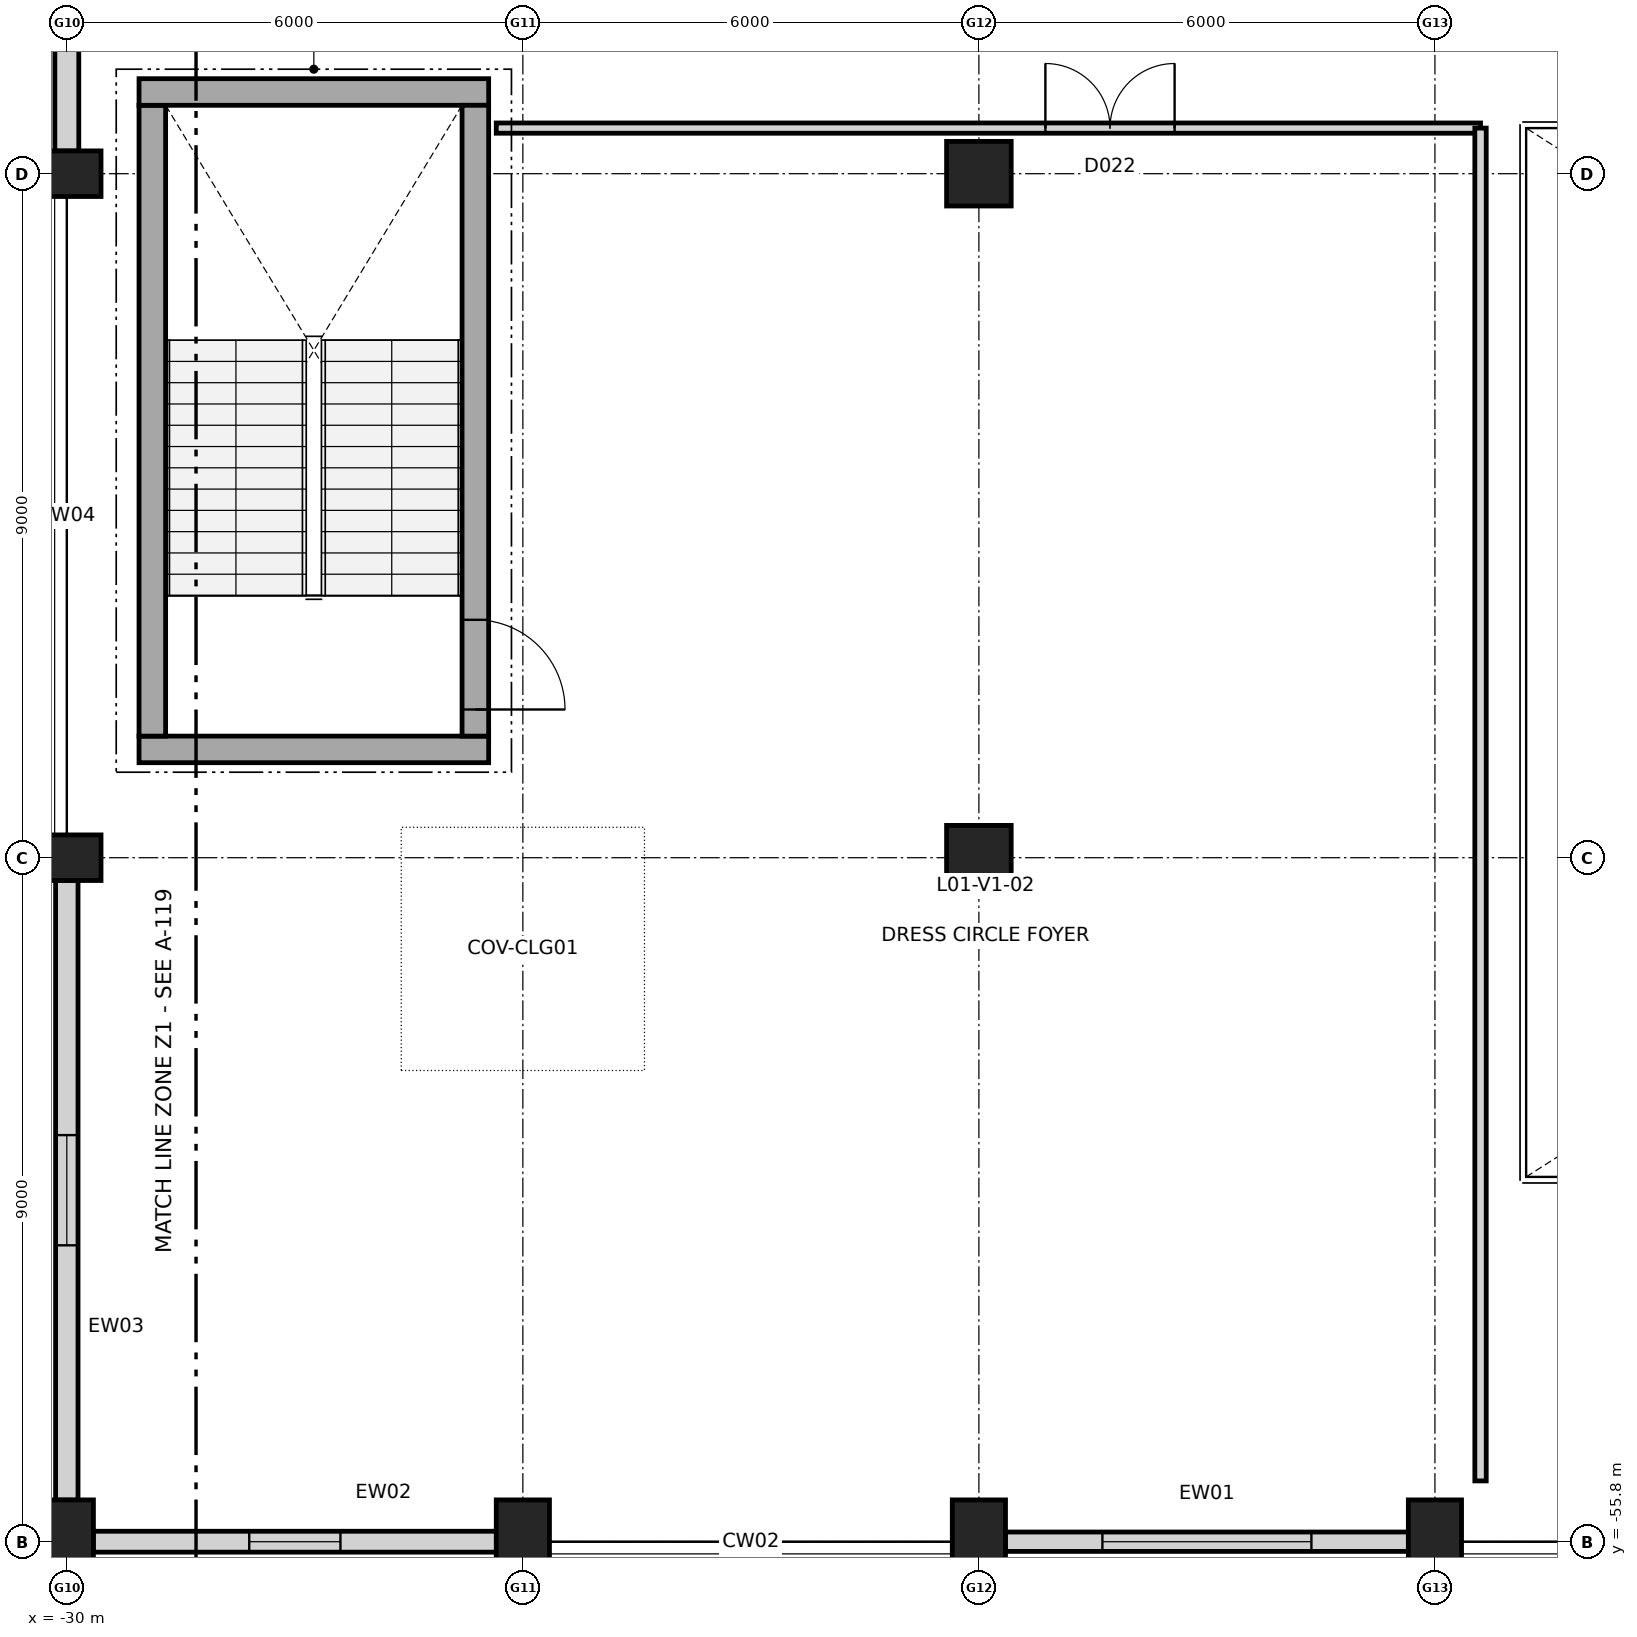
"""IFC4 building model, lengths in metres.
Left out: names, types, materials, properties, quantities, classifications, styles, units other than length and angle.
Written with IfcOpenShell. Run it as: python <this file> out.ifc"""

import sys

from ifc_helpers import new_model, si_unit, direction, frame, frame_2d, origin, origin_2d, place, context, subcontext, project, spatial, rectangle, circle, extrude, element, fill, save


model = new_model("IFC4")
c1 = context("Model", 3, precision=1e-05, world=origin(), true_north=direction((0.0, 1.0)))
c2 = subcontext(c1, "Body", "Model", "MODEL_VIEW")
j1 = project(units=[si_unit("LENGTHUNIT", "METRE"), si_unit("PLANEANGLEUNIT", "RADIAN")], contexts=[c1])
p1 = place(None, origin())
s1 = spatial("IfcSite", under=j1, at=p1, CompositionType="ELEMENT")
p2 = place(p1, origin())
s2 = spatial("IfcBuilding", under=s1, at=p2, CompositionType="ELEMENT")
p3 = place(p2, frame((0.0, 0.0, 5.4)))
s3 = spatial("IfcBuildingStorey", under=s2, at=p3, CompositionType="ELEMENT", Elevation=5.4)
p4 = place(p3, frame((-30.0, -55.8, 0.0), z_axis=(0.0, 0.0, 1.0), x_axis=(1.0, 0.0, 0.0)))
e1 = element("IfcColumn", 1, at=p4, inside=s3, PredefinedType="COLUMN", context=c2, shape_type="SweptSolid", body=[
    extrude(rectangle(XDim=0.7, YDim=1.1, at=origin_2d()), origin(), (0.0, 0.0, 1.0), 4.8),
])
for number, where, z_axis, x_axis in (
    (2, (-30.0, -46.8, 0.0), (0.0, 0.0, 1.0), (0.0, 1.0, 0.0)),
    (3, (-30.0, -37.8, 0.0), (0.0, 0.0, 1.0), (0.0, 1.0, 0.0)),
):
    element("IfcColumn", number, at=place(p3, frame(where, z_axis=z_axis, x_axis=x_axis)), inside=s3, PredefinedType="COLUMN", context=c2, shape_type="SweptSolid", body=[
        extrude(rectangle(XDim=0.6, YDim=0.9, at=origin_2d()), origin(), (0.0, 0.0, 1.0), 4.8),
    ])
for number, where, z_axis, x_axis in (
    (4, (-24.0, -55.8, 0.0), (0.0, 0.0, 1.0), (1.0, 0.0, 0.0)),
    (5, (-18.0, -55.8, 0.0), (0.0, 0.0, 1.0), (1.0, 0.0, 0.0)),
):
    element("IfcColumn", number, at=place(p3, frame(where, z_axis=z_axis, x_axis=x_axis)), inside=s3, PredefinedType="COLUMN", context=c2, shape_type="SweptSolid", body=[
        extrude(rectangle(XDim=0.7, YDim=1.1, at=origin_2d()), origin(), (0.0, 0.0, 1.0), 4.8),
    ])
for number, where, z_axis, x_axis in (
    (6, (-18.0, -46.8, 0.0), (0.0, 0.0, 1.0), (1.0, 0.0, 0.0)),
    (7, (-18.0, -37.8, 0.0), (0.0, 0.0, 1.0), (1.0, 0.0, 0.0)),
):
    element("IfcColumn", number, at=place(p3, frame(where, z_axis=z_axis, x_axis=x_axis)), inside=s3, PredefinedType="COLUMN", context=c2, shape_type="SweptSolid", body=[
        extrude(circle(Radius=0.425, at=origin_2d()), origin(), (0.0, 0.0, 1.0), 4.8),
    ])
p5 = place(p3, frame((-12.0, -55.8, 0.0), z_axis=(0.0, 0.0, 1.0), x_axis=(1.0, 0.0, 0.0)))
e8 = element("IfcColumn", 8, at=p5, inside=s3, PredefinedType="COLUMN", context=c2, shape_type="SweptSolid", body=[
    extrude(rectangle(XDim=0.7, YDim=1.1, at=origin_2d()), origin(), (0.0, 0.0, 1.0), 4.8),
])
p6 = place(p3, frame((-12.348, -55.8, 0.0), z_axis=(0.0, 0.0, 1.0), x_axis=(-1.0, 0.0, 0.0)))
e9 = element("IfcWall", 9, at=p6, inside=s3, PredefinedType="STANDARD", context=c2, shape_type="SweptSolid", body=[
    extrude(rectangle(XDim=5.304, YDim=0.255, at=frame_2d((2.652, 0.0))), origin(), (0.0, 0.0, 1.0), 3.74),
])
p7 = place(p6, frame((1.277, 0.0, 0.85)))
e10 = element("IfcOpeningElement", 10, at=p7, cuts=e9, PredefinedType="OPENING", context=c2, shape_type="SweptSolid", body=[
    extrude(rectangle(XDim=2.75, YDim=1.95, at=frame_2d((1.375, 0.975))), frame((0.0, 0.137, 0.0), z_axis=(0.0, -1.0, 0.0), x_axis=(1.0, 0.0, 0.0)), (0.0, 0.0, 1.0), 0.275),
])
p8 = place(p3, frame((-24.348, -55.8, 0.0), z_axis=(0.0, 0.0, 1.0), x_axis=(-1.0, 0.0, 0.0)))
e11 = element("IfcWall", 11, at=p8, inside=s3, PredefinedType="STANDARD", context=c2, shape_type="SweptSolid", body=[
    extrude(rectangle(XDim=5.304, YDim=0.275, at=frame_2d((2.652, 0.0))), origin(), (0.0, 0.0, 1.0), 3.74),
])
p9 = place(p8, frame((2.052, 0.0, 0.85)))
e12 = element("IfcOpeningElement", 12, at=p9, cuts=e11, PredefinedType="OPENING", context=c2, shape_type="SweptSolid", body=[
    extrude(rectangle(XDim=1.2, YDim=2.1, at=frame_2d((0.6, 1.05))), frame((0.0, 0.147, 0.0), z_axis=(0.0, -1.0, 0.0), x_axis=(1.0, 0.0, 0.0)), (0.0, 0.0, 1.0), 0.295),
])
p10 = place(p3, frame((-30.0, -55.252, 0.0), z_axis=(0.0, 0.0, 1.0), x_axis=(0.0, 1.0, 0.0)))
e13 = element("IfcWall", 13, at=p10, inside=s3, PredefinedType="STANDARD", context=c2, shape_type="SweptSolid", body=[
    extrude(rectangle(XDim=8.154, YDim=0.295, at=frame_2d((4.077, 0.0))), origin(), (0.0, 0.0, 1.0), 3.824),
])
p11 = place(p10, frame((3.352, 0.0, 0.85)))
e14 = element("IfcOpeningElement", 14, at=p11, cuts=e13, PredefinedType="OPENING", context=c2, shape_type="SweptSolid", body=[
    extrude(rectangle(XDim=1.45, YDim=2.1, at=frame_2d((0.725, 1.05))), frame((0.0, 0.157, 0.0), z_axis=(0.0, -1.0, 0.0), x_axis=(1.0, 0.0, 0.0)), (0.0, 0.0, 1.0), 0.315),
])
p12 = place(p3, frame((-30.0, -37.502, 0.0), z_axis=(0.0, 0.0, 1.0), x_axis=(0.0, 1.0, 0.0)))
e15 = element("IfcWall", 15, at=p12, inside=s3, PredefinedType="STANDARD", context=c2, shape_type="SweptSolid", body=[
    extrude(rectangle(XDim=8.404, YDim=0.315, at=frame_2d((4.202, 0.0))), origin(), (0.0, 0.0, 1.0), 3.824),
])
p13 = place(p12, frame((3.377, 0.0, 0.85)))
e16 = element("IfcOpeningElement", 16, at=p13, cuts=e15, PredefinedType="OPENING", context=c2, shape_type="SweptSolid", body=[
    extrude(rectangle(XDim=1.65, YDim=2.1, at=frame_2d((0.825, 1.05))), frame((0.0, 0.167, 0.0), z_axis=(0.0, -1.0, 0.0), x_axis=(1.0, 0.0, 0.0)), (0.0, 0.0, 1.0), 0.335),
])
p14 = place(p3, frame((-24.45, -45.375, 0.0), z_axis=(0.0, 0.0, 1.0), x_axis=(-1.0, 0.0, 0.0)))
e17 = element("IfcWall", 17, at=p14, inside=s3, PredefinedType="SHEAR", context=c2, shape_type="SweptSolid", body=[
    extrude(rectangle(XDim=4.6, YDim=0.35, at=frame_2d((2.3, 0.0))), origin(), (0.0, 0.0, 1.0), 4.8),
])
p15 = place(p3, frame((-28.875, -45.2, 0.0), z_axis=(0.0, 0.0, 1.0), x_axis=(0.0, 1.0, 0.0)))
e18 = element("IfcWall", 18, at=p15, inside=s3, PredefinedType="SHEAR", context=c2, shape_type="SweptSolid", body=[
    extrude(rectangle(XDim=8.3, YDim=0.35, at=frame_2d((4.15, 0.0))), origin(), (0.0, 0.0, 1.0), 4.8),
])
p16 = place(p3, frame((-29.05, -36.725, 0.0), z_axis=(0.0, 0.0, 1.0), x_axis=(1.0, 0.0, 0.0)))
e19 = element("IfcWall", 19, at=p16, inside=s3, PredefinedType="SHEAR", context=c2, shape_type="SweptSolid", body=[
    extrude(rectangle(XDim=4.6, YDim=0.35, at=frame_2d((2.3, 0.0))), origin(), (0.0, 0.0, 1.0), 4.8),
])
p17 = place(p3, frame((-24.625, -36.9, 0.0), z_axis=(0.0, 0.0, 1.0), x_axis=(0.0, -1.0, 0.0)))
e20 = element("IfcWall", 20, at=p17, inside=s3, PredefinedType="SHEAR", context=c2, shape_type="SweptSolid", body=[
    extrude(rectangle(XDim=8.3, YDim=0.35, at=frame_2d((4.15, 0.0))), origin(), (0.0, 0.0, 1.0), 4.8),
])
p18 = place(p17, frame((6.77, 0.0, 0.0)))
e21 = element("IfcOpeningElement", 21, at=p18, cuts=e20, PredefinedType="OPENING", context=c2, shape_type="SweptSolid", body=[
    extrude(rectangle(XDim=1.18, YDim=2.15, at=frame_2d((0.59, 1.075))), frame((0.0, 0.185, 0.0), z_axis=(0.0, -1.0, 0.0), x_axis=(1.0, 0.0, 0.0)), (0.0, 0.0, 1.0), 0.37),
])
p19 = place(p3, frame((-24.35, -37.2, 0.0), z_axis=(0.0, 0.0, 1.0), x_axis=(1.0, 0.0, 0.0)))
e22 = element("IfcWall", 22, at=p19, inside=s3, PredefinedType="PARTITIONING", context=c2, shape_type="SweptSolid", body=[
    extrude(rectangle(XDim=12.95, YDim=0.135, at=frame_2d((6.475, 0.0))), origin(), (0.0, 0.0, 1.0), 4.42),
])
p20 = place(p19, frame((7.225, 0.0, 0.0)))
e23 = element("IfcOpeningElement", 23, at=p20, cuts=e22, PredefinedType="OPENING", context=c2, shape_type="SweptSolid", body=[
    extrude(rectangle(XDim=1.7, YDim=2.25, at=frame_2d((0.85, 1.125))), frame((0.0, 0.077, 0.0), z_axis=(0.0, -1.0, 0.0), x_axis=(1.0, 0.0, 0.0)), (0.0, 0.0, 1.0), 0.155),
])
p21 = place(p3, frame((-11.4, -55.0, 0.0), z_axis=(0.0, 0.0, 1.0), x_axis=(0.0, 1.0, 0.0)))
e24 = element("IfcWall", 24, at=p21, inside=s3, PredefinedType="PARTITIONING", context=c2, shape_type="SweptSolid", body=[
    extrude(rectangle(XDim=17.8, YDim=0.15, at=frame_2d((8.9, 0.0))), origin(), (0.0, 0.0, 1.0), 4.42),
])
p22 = place(p7, origin())
e25 = element("IfcWindow", 25, at=p22, inside=s3, PartitioningType="SINGLE_PANEL", PredefinedType="WINDOW", context=c2, shape_type="SweptSolid", body=[
    extrude(rectangle(XDim=2.75, YDim=1.95, at=frame_2d((1.375, 0.975))), frame((0.0, 0.03, 0.0), z_axis=(0.0, -1.0, 0.0), x_axis=(1.0, 0.0, 0.0)), (0.0, 0.0, 1.0), 0.06),
])
fill(e10, e25)
p23 = place(p9, origin())
e26 = element("IfcWindow", 26, at=p23, inside=s3, PartitioningType="SINGLE_PANEL", PredefinedType="WINDOW", context=c2, shape_type="SweptSolid", body=[
    extrude(rectangle(XDim=1.2, YDim=2.1, at=frame_2d((0.6, 1.05))), frame((0.0, 0.03, 0.0), z_axis=(0.0, -1.0, 0.0), x_axis=(1.0, 0.0, 0.0)), (0.0, 0.0, 1.0), 0.06),
])
fill(e12, e26)
p24 = place(p11, origin())
e27 = element("IfcWindow", 27, at=p24, inside=s3, PartitioningType="SINGLE_PANEL", PredefinedType="WINDOW", context=c2, shape_type="SweptSolid", body=[
    extrude(rectangle(XDim=1.45, YDim=2.1, at=frame_2d((0.725, 1.05))), frame((0.0, 0.03, 0.0), z_axis=(0.0, -1.0, 0.0), x_axis=(1.0, 0.0, 0.0)), (0.0, 0.0, 1.0), 0.06),
])
fill(e14, e27)
p25 = place(p18, origin())
e28 = element("IfcDoor", 28, at=p25, inside=s3, OperationType="SINGLE_SWING_RIGHT", PredefinedType="DOOR", context=c2, shape_type="SweptSolid", body=[
    extrude(rectangle(XDim=1.18, YDim=2.15, at=frame_2d((0.59, 1.075))), frame((0.0, 0.025, 0.0), z_axis=(0.0, -1.0, 0.0), x_axis=(1.0, 0.0, 0.0)), (0.0, 0.0, 1.0), 0.05),
])
fill(e21, e28)
p26 = place(p20, origin())
e29 = element("IfcDoor", 29, at=p26, inside=s3, OperationType="DOUBLE_DOOR_SINGLE_SWING", PredefinedType="DOOR", context=c2, shape_type="SweptSolid", body=[
    extrude(rectangle(XDim=1.7, YDim=2.25, at=frame_2d((0.85, 1.125))), frame((0.0, 0.025, 0.0), z_axis=(0.0, -1.0, 0.0), x_axis=(1.0, 0.0, 0.0)), (0.0, 0.0, 1.0), 0.05),
])
fill(e23, e29)
save(model, sys.argv[1])
